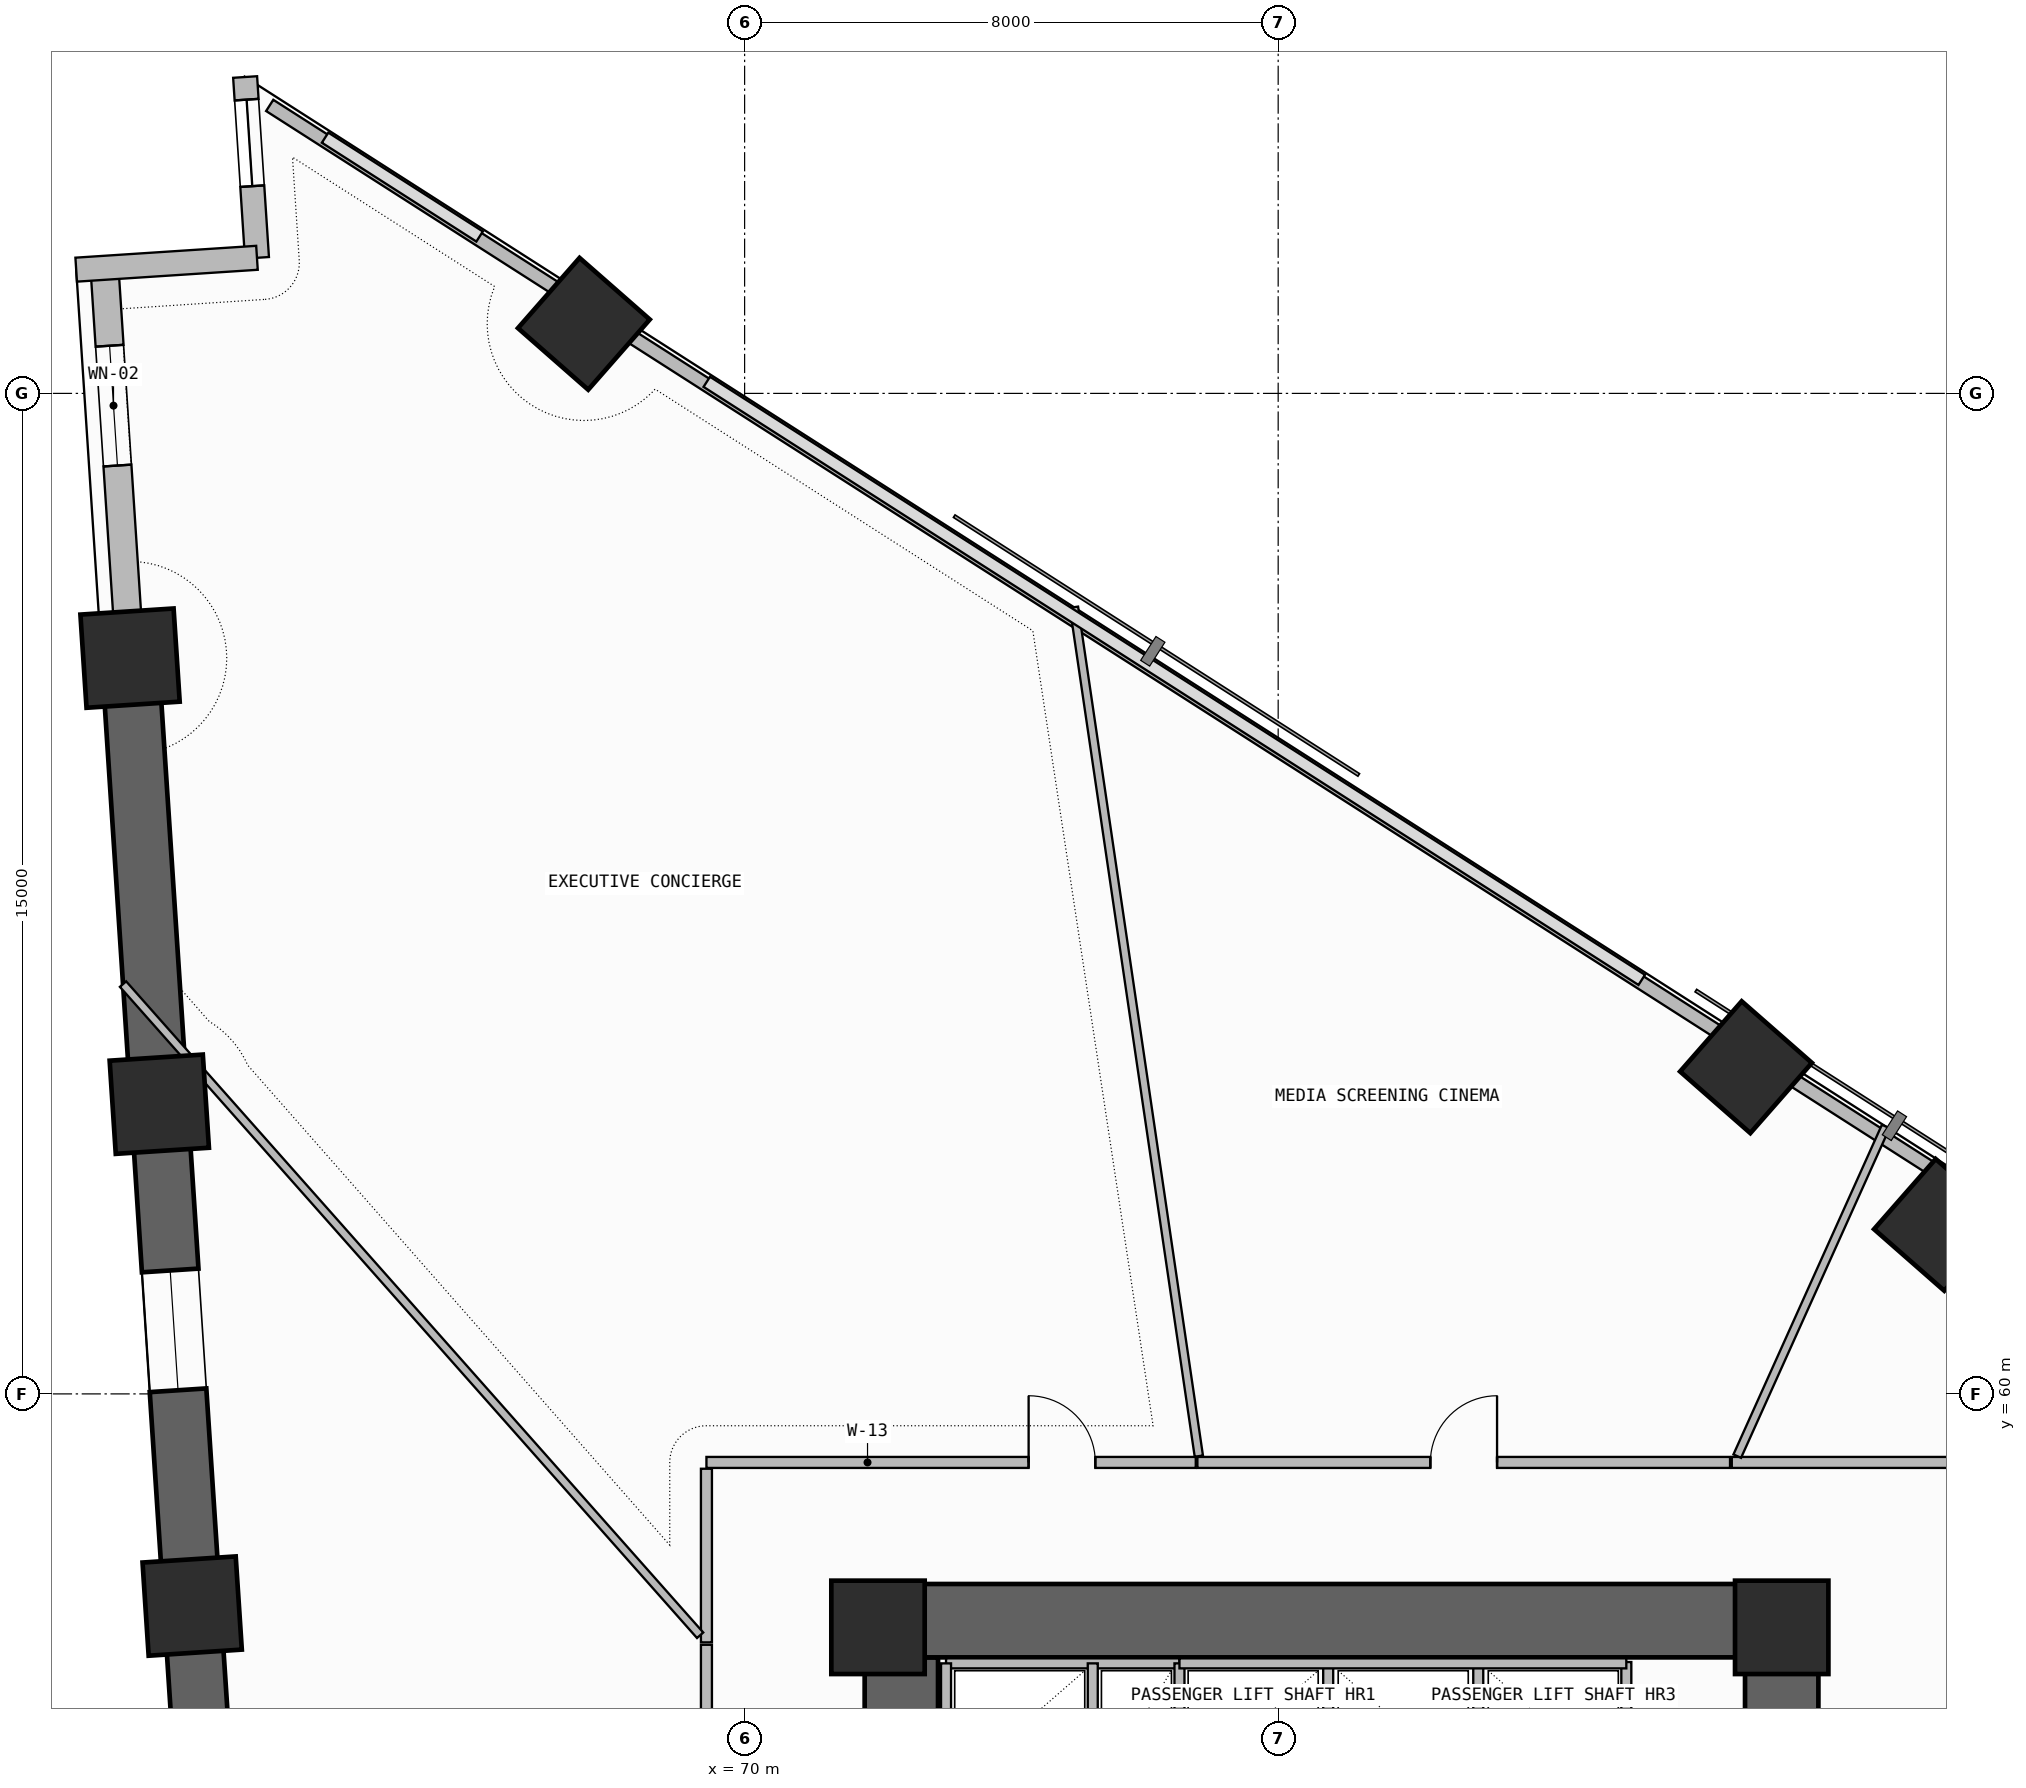
"""IFC4 building model, lengths in metres.
Left out: names, types, materials, properties, quantities, classifications, styles, units other than length and angle.
Written with IfcOpenShell. Run it as: python <this file> out.ifc"""

import sys

from ifc_helpers import new_model, si_unit, direction, frame, frame_2d, origin, origin_2d, place, context, subcontext, project, spatial, rectangle, extrude, element, fill, save


model = new_model("IFC4")
c1 = context("Model", 3, precision=1e-05, world=origin(), true_north=direction((0.0, 1.0)))
c2 = subcontext(c1, "Body", "Model", "MODEL_VIEW")
j1 = project(units=[si_unit("LENGTHUNIT", "METRE"), si_unit("PLANEANGLEUNIT", "RADIAN")], contexts=[c1])
p1 = place(None, origin())
s1 = spatial("IfcSite", under=j1, at=p1, CompositionType="ELEMENT")
p2 = place(p1, origin())
s2 = spatial("IfcBuilding", under=s1, at=p2, CompositionType="ELEMENT")
p3 = place(p2, frame((0.0, 0.0, 63.3)))
s3 = spatial("IfcBuildingStorey", under=s2, at=p3, CompositionType="ELEMENT", Elevation=63.3)
p4 = place(p3, frame((72.35, 43.35, -0.4), z_axis=(0.0, 0.0, 1.0), x_axis=(0.0, 1.0, 0.0)))
e1 = element("IfcWall", 1, at=p4, inside=s3, PredefinedType="SHEAR", context=c2, shape_type="SweptSolid", body=[
    extrude(rectangle(XDim=12.7, YDim=1.1, at=frame_2d((6.35, 0.0))), origin(), (0.0, 0.0, 1.0), 3.74),
])
p5 = place(p4, frame((1.35, 0.0, 0.4)))
e2 = element("IfcOpeningElement", 2, at=p5, cuts=e1, PredefinedType="OPENING", context=c2, shape_type="SweptSolid", body=[
    extrude(rectangle(XDim=1.2, YDim=2.2, at=frame_2d((0.6, 1.1))), frame((0.0, 0.56, 0.0), z_axis=(0.0, -1.0, 0.0), x_axis=(1.0, 0.0, 0.0)), (0.0, 0.0, 1.0), 1.12),
])
p6 = place(p3, frame((71.8, 56.6, -0.4), z_axis=(0.0, 0.0, 1.0), x_axis=(1.0, 0.0, 0.0)))
e3 = element("IfcWall", 3, at=p6, inside=s3, PredefinedType="SHEAR", context=c2, shape_type="SweptSolid", body=[
    extrude(rectangle(XDim=14.3, YDim=1.1, at=frame_2d((7.15, 0.0))), origin(), (0.0, 0.0, 1.0), 3.74),
])
p7 = place(p3, frame((85.55, 47.6, -0.4), z_axis=(0.0, 0.0, 1.0), x_axis=(0.0, 1.0, 0.0)))
e4 = element("IfcWall", 4, at=p7, inside=s3, PredefinedType="SHEAR", context=c2, shape_type="SweptSolid", body=[
    extrude(rectangle(XDim=8.45, YDim=1.1, at=frame_2d((4.225, 0.0))), origin(), (0.0, 0.0, 1.0), 3.74),
])
for number, where, z_axis, x_axis in (
    (5, (72.0, 56.5, 0.0), (0.0, 0.0, 1.0), (1.0, 0.0, 0.0)),
    (6, (85.55, 56.5, 0.0), (0.0, 0.0, 1.0), (1.0, 0.0, 0.0)),
):
    element("IfcColumn", number, at=place(p3, frame(where, z_axis=z_axis, x_axis=x_axis)), inside=s3, PredefinedType="COLUMN", context=c2, shape_type="SweptSolid", body=[
        extrude(rectangle(XDim=1.4, YDim=1.4, at=origin_2d()), origin(), (0.0, 0.0, 1.0), 3.6),
    ])
for number, where, z_axis, x_axis in (
    (7, (87.923, 62.534, -0.4), (0.0, 0.0, 1.0), (0.659, 0.752, 0.0)),
    (8, (85.015, 64.898, -0.4), (0.0, 0.0, 1.0), (0.659, 0.752, 0.0)),
    (9, (67.59, 76.043, -0.4), (0.0, 0.0, 1.0), (0.659, 0.752, 0.0)),
    (10, (60.785, 71.031, -0.4), (0.0, 0.0, 1.0), (-0.065, 0.998, 0.0)),
    (11, (61.224, 64.343, -0.4), (0.0, 0.0, 1.0), (-0.065, 0.998, 0.0)),
    (12, (61.717, 56.819, -0.4), (0.0, 0.0, 1.0), (-0.065, 0.998, 0.0)),
):
    element("IfcColumn", number, at=place(p3, frame(where, z_axis=z_axis, x_axis=x_axis)), inside=s3, PredefinedType="COLUMN", context=c2, shape_type="SweptSolid", body=[
        extrude(rectangle(XDim=1.4, YDim=1.4, at=origin_2d()), origin(), (0.0, 0.0, 1.0), 4.0),
    ])
p8 = place(p3, frame((60.402, 76.883, 0.0), z_axis=(0.0, 0.0, 1.0), x_axis=(0.065402662459, -0.997858953832, 0.0)))
e13 = element("IfcWall", 13, at=p8, inside=s3, PredefinedType="SOLIDWALL", context=c2, shape_type="SweptSolid", body=[
    extrude(rectangle(XDim=5.864, YDim=0.42, at=frame_2d((2.932, 0.0))), origin(), (0.0, 0.0, 1.0), 2.725),
])
p9 = place(p8, frame((1.171, 0.0, 1.2)))
e14 = element("IfcOpeningElement", 14, at=p9, cuts=e13, PredefinedType="OPENING", context=c2, shape_type="SweptSolid", body=[
    extrude(rectangle(XDim=1.8, YDim=0.9, at=frame_2d((0.9, 0.45))), frame((0.0, 0.22, 0.0), z_axis=(0.0, -1.0, 0.0), x_axis=(1.0, 0.0, 0.0)), (0.0, 0.0, 1.0), 0.44),
])
p10 = place(p3, frame((60.785, 71.031, -0.4), z_axis=(0.0, 0.0, 1.0), x_axis=(0.065409824833, -0.997858484363, 0.0)))
e15 = element("IfcWall", 15, at=p10, inside=s3, PredefinedType="SHEAR", context=c2, shape_type="SweptSolid", body=[
    extrude(rectangle(XDim=21.783, YDim=0.85, at=frame_2d((10.891, 0.0))), origin(), (0.0, 0.0, 1.0), 3.74),
])
p11 = place(p10, frame((9.2, 0.0, 1.2)))
e16 = element("IfcOpeningElement", 16, at=p11, cuts=e15, PredefinedType="OPENING", context=c2, shape_type="SweptSolid", body=[
    extrude(rectangle(XDim=1.8, YDim=0.9, at=frame_2d((0.9, 0.45))), frame((0.0, 0.435, 0.0), z_axis=(0.0, -1.0, 0.0), x_axis=(1.0, 0.0, 0.0)), (0.0, 0.0, 1.0), 0.87),
])
p12 = place(p3, frame((62.511, 79.743, 0.0), z_axis=(0.0, 0.0, 1.0), x_axis=(0.065337885661, -0.997863197386, 0.0)))
e17 = element("IfcWall", 17, at=p12, inside=s3, PredefinedType="SOLIDWALL", context=c2, shape_type="SweptSolid", body=[
    extrude(rectangle(XDim=2.717, YDim=0.36, at=frame_2d((1.358, 0.0))), origin(), (0.0, 0.0, 1.0), 3.34),
])
p13 = place(p12, frame((0.34, 0.0, 0.45)))
e18 = element("IfcOpeningElement", 18, at=p13, cuts=e17, PredefinedType="OPENING", context=c2, shape_type="SweptSolid", body=[
    extrude(rectangle(XDim=1.3, YDim=2.4, at=frame_2d((0.65, 1.2))), frame((0.0, 0.19, 0.0), z_axis=(0.0, -1.0, 0.0), x_axis=(1.0, 0.0, 0.0)), (0.0, 0.0, 1.0), 0.38),
])
p14 = place(p3, frame((62.688, 77.033, 0.0), z_axis=(0.0, 0.0, 1.0), x_axis=(-0.99785694905, -0.065433242561, 0.0)))
e19 = element("IfcWall", 19, at=p14, inside=s3, PredefinedType="SOLIDWALL", context=c2, shape_type="SweptSolid", body=[
    extrude(rectangle(XDim=2.716, YDim=0.36, at=frame_2d((1.358, 0.0))), origin(), (0.0, 0.0, 1.0), 3.34),
])
p15 = place(p3, frame((93.176, 59.939, 0.0), z_axis=(0.0, 0.0, 1.0), x_axis=(-0.842413081081, 0.538832256666, 0.0)))
e20 = element("IfcWall", 20, at=p15, inside=s3, PredefinedType="PARAPET", context=c2, shape_type="SweptSolid", body=[
    extrude(rectangle(XDim=9.011, YDim=0.2, at=frame_2d((4.505, 0.0))), origin(), (0.0, 0.0, 1.0), 1.15),
])
p16 = place(p3, frame((84.682, 65.372, 0.0), z_axis=(0.0, 0.0, 1.0), x_axis=(-0.842418773655, 0.538823356763, 0.0)))
e21 = element("IfcWall", 21, at=p16, inside=s3, PredefinedType="PARAPET", context=c2, shape_type="SweptSolid", body=[
    extrude(rectangle(XDim=19.612, YDim=0.2, at=frame_2d((9.806, 0.0))), origin(), (0.0, 0.0, 1.0), 1.15),
])
p17 = place(p3, frame((67.257, 76.518, 0.0), z_axis=(0.0, 0.0, 1.0), x_axis=(-0.842403631411, 0.538847030042, 0.0)))
e22 = element("IfcWall", 22, at=p17, inside=s3, PredefinedType="PARAPET", context=c2, shape_type="SweptSolid", body=[
    extrude(rectangle(XDim=5.196, YDim=0.2, at=frame_2d((2.598, 0.0))), origin(), (0.0, 0.0, 1.0), 1.15),
])
p18 = place(p3, frame((73.02, 55.96, 0.0), z_axis=(0.0, 0.0, 1.0), x_axis=(1.0, 0.0, 0.0)))
e23 = element("IfcWall", 23, at=p18, inside=s3, PredefinedType="SOLIDWALL", context=c2, shape_type="SweptSolid", body=[
    extrude(rectangle(XDim=3.5, YDim=0.15, at=frame_2d((1.75, 0.0))), origin(), (0.0, 0.0, 1.0), 3.34),
])
p19 = place(p3, frame((73.02, 54.02, 0.0), z_axis=(0.0, 0.0, 1.0), x_axis=(0.0, 1.0, 0.0)))
e24 = element("IfcWall", 24, at=p19, inside=s3, PredefinedType="PLUMBINGWALL", context=c2, shape_type="SweptSolid", body=[
    extrude(rectangle(XDim=1.94, YDim=0.15, at=frame_2d((0.97, 0.0))), origin(), (0.0, 0.0, 1.0), 3.34),
])
p20 = place(p3, frame((76.52, 54.02, 0.0), z_axis=(0.0, 0.0, 1.0), x_axis=(0.0, 1.0, 0.0)))
e25 = element("IfcWall", 25, at=p20, inside=s3, PredefinedType="SOLIDWALL", context=c2, shape_type="SweptSolid", body=[
    extrude(rectangle(XDim=1.94, YDim=0.15, at=frame_2d((0.97, 0.0))), origin(), (0.0, 0.0, 1.0), 3.34),
])
p21 = place(p3, frame((75.22, 54.02, 0.0), z_axis=(0.0, 0.0, 1.0), x_axis=(0.0, 1.0, 0.0)))
e26 = element("IfcWall", 26, at=p21, inside=s3, PredefinedType="PLUMBINGWALL", context=c2, shape_type="SweptSolid", body=[
    extrude(rectangle(XDim=1.94, YDim=0.15, at=frame_2d((0.97, 0.0))), origin(), (0.0, 0.0, 1.0), 3.34),
])
for number, where, z_axis, x_axis in (
    (27, (78.75, 54.02, 0.0), (0.0, 0.0, 1.0), (0.0, 1.0, 0.0)),
    (28, (81.0, 54.02, 0.0), (0.0, 0.0, 1.0), (0.0, 1.0, 0.0)),
):
    element("IfcWall", number, at=place(p3, frame(where, z_axis=z_axis, x_axis=x_axis)), inside=s3, PredefinedType="PLUMBINGWALL", context=c2, shape_type="SweptSolid", body=[
        extrude(rectangle(XDim=1.96, YDim=0.15, at=frame_2d((0.98, 0.0))), origin(), (0.0, 0.0, 1.0), 3.34),
    ])
p22 = place(p3, frame((83.22, 54.02, 0.0), z_axis=(0.0, 0.0, 1.0), x_axis=(0.0, 1.0, 0.0)))
e29 = element("IfcWall", 29, at=p22, inside=s3, PredefinedType="SOLIDWALL", context=c2, shape_type="SweptSolid", body=[
    extrude(rectangle(XDim=1.96, YDim=0.15, at=frame_2d((0.98, 0.0))), origin(), (0.0, 0.0, 1.0), 3.34),
])
p23 = place(p3, frame((76.52, 55.96, 0.0), z_axis=(0.0, 0.0, 1.0), x_axis=(1.0, 0.0, 0.0)))
e30 = element("IfcWall", 30, at=p23, inside=s3, PredefinedType="SOLIDWALL", context=c2, shape_type="SweptSolid", body=[
    extrude(rectangle(XDim=6.7, YDim=0.15, at=frame_2d((3.35, 0.0))), origin(), (0.0, 0.0, 1.0), 3.34),
])
p24 = place(p3, frame((88.083, 58.972, 0.0), z_axis=(0.0, 0.0, 1.0), x_axis=(-1.0, 0.0, 0.0)))
e31 = element("IfcWall", 31, at=p24, inside=s3, PredefinedType="PARTITIONING", context=c2, shape_type="SweptSolid", body=[
    extrude(rectangle(XDim=3.282, YDim=0.165, at=frame_2d((1.641, 0.0))), origin(), (0.0, 0.0, 1.0), 2.725),
])
p25 = place(p3, frame((84.883, 59.067, 0.0), z_axis=(0.0, 0.0, 1.0), x_axis=(0.41061747733, 0.911807703033, 0.0)))
e32 = element("IfcWall", 32, at=p25, inside=s3, PredefinedType="PARTITIONING", context=c2, shape_type="SweptSolid", body=[
    extrude(rectangle(XDim=5.421, YDim=0.125, at=frame_2d((2.71, 0.0))), origin(), (0.0, 0.0, 1.0), 2.725),
])
p26 = place(p3, frame((84.775, 58.972, 0.0), z_axis=(0.0, 0.0, 1.0), x_axis=(-1.0, 0.0, 0.0)))
e33 = element("IfcWall", 33, at=p26, inside=s3, PredefinedType="PARTITIONING", context=c2, shape_type="SweptSolid", body=[
    extrude(rectangle(XDim=7.986, YDim=0.165, at=frame_2d((3.993, 0.0))), origin(), (0.0, 0.0, 1.0), 3.34),
])
p27 = place(p26, frame((3.493, 0.0, 0.0)))
e34 = element("IfcOpeningElement", 34, at=p27, cuts=e33, PredefinedType="OPENING", context=c2, shape_type="SweptSolid", body=[
    extrude(rectangle(XDim=1.0, YDim=2.2, at=frame_2d((0.5, 1.1))), frame((0.0, 0.093, 0.0), z_axis=(0.0, -1.0, 0.0), x_axis=(1.0, 0.0, 0.0)), (0.0, 0.0, 1.0), 0.185),
])
p28 = place(p3, frame((76.81, 59.067, 0.0), z_axis=(0.0, 0.0, 1.0), x_axis=(-0.145525133375, 0.989354555029, 0.0)))
e35 = element("IfcWall", 35, at=p28, inside=s3, PredefinedType="PARTITIONING", context=c2, shape_type="SweptSolid", body=[
    extrude(rectangle(XDim=12.864, YDim=0.125, at=frame_2d((6.432, 0.0))), origin(), (0.0, 0.0, 1.0), 2.875),
])
p29 = place(p3, frame((76.764, 58.972, 0.0), z_axis=(0.0, 0.0, 1.0), x_axis=(-1.0, 0.0, 0.0)))
e36 = element("IfcWall", 36, at=p29, inside=s3, PredefinedType="PARTITIONING", context=c2, shape_type="SweptSolid", body=[
    extrude(rectangle(XDim=7.337, YDim=0.165, at=frame_2d((3.668, 0.0))), origin(), (0.0, 0.0, 1.0), 2.725),
])
p30 = place(p29, frame((1.506, 0.0, 0.0)))
e37 = element("IfcOpeningElement", 37, at=p30, cuts=e36, PredefinedType="OPENING", context=c2, shape_type="SweptSolid", body=[
    extrude(rectangle(XDim=1.0, YDim=2.2, at=frame_2d((0.5, 1.1))), frame((0.0, 0.093, 0.0), z_axis=(0.0, -1.0, 0.0), x_axis=(1.0, 0.0, 0.0)), (0.0, 0.0, 1.0), 0.185),
])
p31 = place(p3, frame((69.427, 58.878, 0.0), z_axis=(0.0, 0.0, 1.0), x_axis=(0.0, -1.0, 0.0)))
e38 = element("IfcWall", 38, at=p31, inside=s3, PredefinedType="PARTITIONING", context=c2, shape_type="SweptSolid", body=[
    extrude(rectangle(XDim=2.603, YDim=0.165, at=frame_2d((1.302, 0.0))), origin(), (0.0, 0.0, 1.0), 2.725),
])
p32 = place(p3, frame((69.333, 56.381, 0.0), z_axis=(0.0, 0.0, 1.0), x_axis=(-0.663307276118, 0.748347150358, 0.0)))
e39 = element("IfcWall", 39, at=p32, inside=s3, PredefinedType="PARTITIONING", context=c2, shape_type="SweptSolid", body=[
    extrude(rectangle(XDim=13.045, YDim=0.125, at=frame_2d((6.523, 0.0))), origin(), (0.0, 0.0, 1.0), 2.725),
])
p33 = place(p3, frame((69.427, 56.238, 0.0), z_axis=(0.0, 0.0, 1.0), x_axis=(0.0, -1.0, 0.0)))
e40 = element("IfcWall", 40, at=p33, inside=s3, PredefinedType="PARTITIONING", context=c2, shape_type="SweptSolid", body=[
    extrude(rectangle(XDim=7.886, YDim=0.165, at=frame_2d((3.943, 0.0))), origin(), (0.0, 0.0, 1.0), 2.725),
])
p34 = place(p33, frame((4.416, 0.0, 0.0)))
e41 = element("IfcOpeningElement", 41, at=p34, cuts=e40, PredefinedType="OPENING", context=c2, shape_type="SweptSolid", body=[
    extrude(rectangle(XDim=1.0, YDim=2.2, at=frame_2d((0.5, 1.1))), frame((0.0, 0.093, 0.0), z_axis=(0.0, -1.0, 0.0), x_axis=(1.0, 0.0, 0.0)), (0.0, 0.0, 1.0), 0.185),
])
p35 = place(p9, origin())
e42 = element("IfcWindow", 42, at=p35, inside=s3, PartitioningType="SINGLE_PANEL", PredefinedType="WINDOW", context=c2, shape_type="SweptSolid", body=[
    extrude(rectangle(XDim=1.8, YDim=0.9, at=frame_2d((0.9, 0.45))), frame((0.0, 0.03, 0.0), z_axis=(0.0, -1.0, 0.0), x_axis=(1.0, 0.0, 0.0)), (0.0, 0.0, 1.0), 0.06),
])
fill(e14, e42)
p36 = place(p11, origin())
e43 = element("IfcWindow", 43, at=p36, inside=s3, PartitioningType="SINGLE_PANEL", PredefinedType="WINDOW", context=c2, shape_type="SweptSolid", body=[
    extrude(rectangle(XDim=1.8, YDim=0.9, at=frame_2d((0.9, 0.45))), frame((0.0, 0.03, 0.0), z_axis=(0.0, -1.0, 0.0), x_axis=(1.0, 0.0, 0.0)), (0.0, 0.0, 1.0), 0.06),
])
fill(e16, e43)
p37 = place(p13, origin())
e44 = element("IfcWindow", 44, at=p37, inside=s3, PartitioningType="SINGLE_PANEL", PredefinedType="WINDOW", context=c2, shape_type="SweptSolid", body=[
    extrude(rectangle(XDim=1.3, YDim=2.4, at=frame_2d((0.65, 1.2))), frame((0.0, 0.03, 0.0), z_axis=(0.0, -1.0, 0.0), x_axis=(1.0, 0.0, 0.0)), (0.0, 0.0, 1.0), 0.06),
])
fill(e18, e44)
p38 = place(p27, frame((1.0, 0.0, 0.0), z_axis=(0.0, 0.0, 1.0), x_axis=(-1.0, 0.0, 0.0)))
e45 = element("IfcDoor", 45, at=p38, inside=s3, OperationType="SINGLE_SWING_RIGHT", PredefinedType="DOOR", context=c2, shape_type="SweptSolid", body=[
    extrude(rectangle(XDim=1.0, YDim=2.2, at=frame_2d((0.5, 1.1))), frame((0.0, 0.025, 0.0), z_axis=(0.0, -1.0, 0.0), x_axis=(1.0, 0.0, 0.0)), (0.0, 0.0, 1.0), 0.05),
])
fill(e34, e45)
p39 = place(p30, frame((1.0, 0.0, 0.0), z_axis=(0.0, 0.0, 1.0), x_axis=(-1.0, 0.0, 0.0)))
e46 = element("IfcDoor", 46, at=p39, inside=s3, OperationType="SINGLE_SWING_LEFT", PredefinedType="DOOR", context=c2, shape_type="SweptSolid", body=[
    extrude(rectangle(XDim=1.0, YDim=2.2, at=frame_2d((0.5, 1.1))), frame((0.0, 0.025, 0.0), z_axis=(0.0, -1.0, 0.0), x_axis=(1.0, 0.0, 0.0)), (0.0, 0.0, 1.0), 0.05),
])
fill(e37, e46)
save(model, sys.argv[1])
